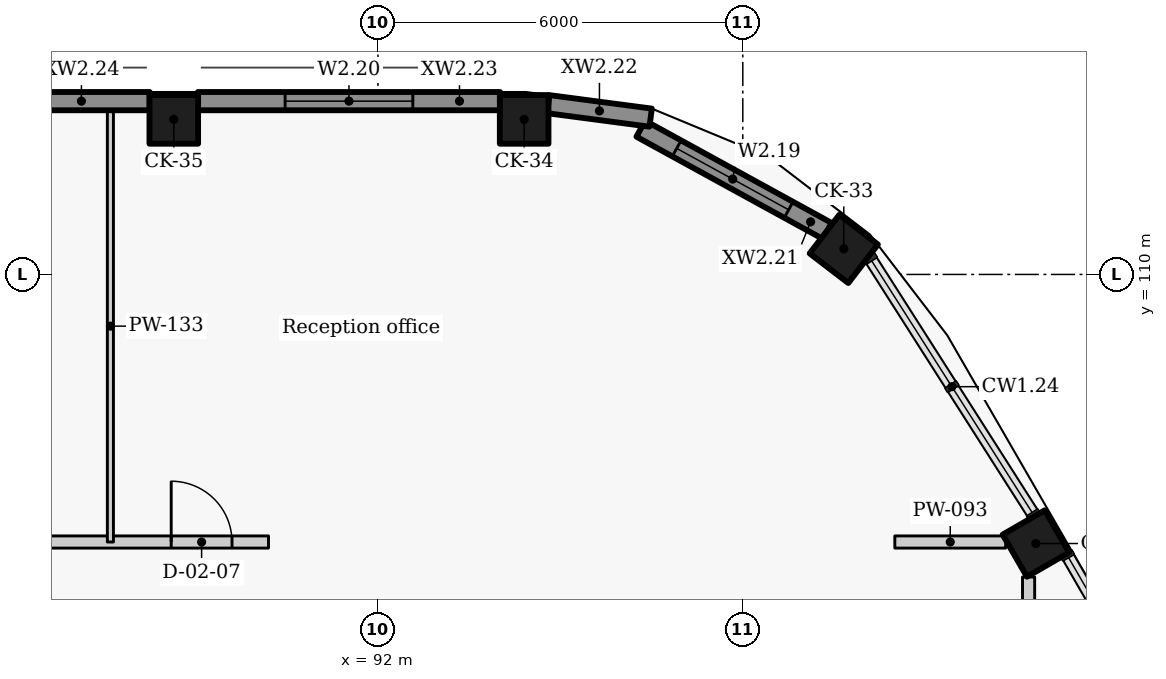
"""IFC4 building model, lengths in metres.
Left out: names, types, materials, properties, quantities, classifications, styles, units other than length and angle.
Written with IfcOpenShell. Run it as: python <this file> out.ifc"""

import sys

from ifc_helpers import new_model, si_unit, direction, frame, frame_2d, origin, origin_2d, place, context, subcontext, project, spatial, rectangle, extrude, element, fill, save


model = new_model("IFC4")
c1 = context("Model", 3, precision=1e-05, world=origin(), true_north=direction((0.0, 1.0)))
c2 = subcontext(c1, "Body", "Model", "MODEL_VIEW")
j1 = project(units=[si_unit("LENGTHUNIT", "METRE"), si_unit("PLANEANGLEUNIT", "RADIAN")], contexts=[c1])
p1 = place(None, origin())
s1 = spatial("IfcSite", under=j1, at=p1, CompositionType="ELEMENT")
p2 = place(p1, origin())
s2 = spatial("IfcBuilding", under=s1, at=p2, CompositionType="ELEMENT")
p3 = place(p2, frame((0.0, 0.0, 6.6)))
s3 = spatial("IfcBuildingStorey", under=s2, at=p3, CompositionType="ELEMENT", Elevation=6.6)
for number, where, z_axis, x_axis in (
    (1, (102.82, 105.575, 0.0), (0.0, 0.0, 1.0), (-0.5, 0.866, 0.0)),
    (2, (99.661, 110.419, 0.0), (0.0, 0.0, 1.0), (-0.793, 0.609, 0.0)),
    (3, (94.404, 112.55, 0.0), (0.0, 0.0, 1.0), (-1.0, 0.0, 0.0)),
    (4, (88.643, 112.55, 0.0), (0.0, 0.0, 1.0), (-1.0, 0.0, 0.0)),
):
    element("IfcColumn", number, at=place(p3, frame(where, z_axis=z_axis, x_axis=x_axis)), inside=s3, PredefinedType="COLUMN", context=c2, shape_type="SweptSolid", body=[
        extrude(rectangle(XDim=0.8, YDim=0.8, at=origin_2d()), origin(), (0.0, 0.0, 1.0), 4.8),
    ])
p4 = place(p3, frame((99.389, 110.715, 0.0), z_axis=(0.0, 0.0, 1.0), x_axis=(-0.876785818174, 0.480881096581, 0.0)))
e5 = element("IfcWall", 5, at=p4, inside=s3, PredefinedType="SOLIDWALL", context=c2, shape_type="SweptSolid", body=[
    extrude(rectangle(XDim=3.497, YDim=0.3, at=frame_2d((1.748, 0.0))), origin(), (0.0, 0.0, 1.0), 3.6),
])
p5 = place(p4, frame((0.723, 0.0, 0.9)))
e6 = element("IfcOpeningElement", 6, at=p5, cuts=e5, PredefinedType="OPENING", context=c2, shape_type="SweptSolid", body=[
    extrude(rectangle(XDim=2.1, YDim=2.05, at=frame_2d((1.05, 1.025))), frame((0.0, 0.16, 0.0), z_axis=(0.0, -1.0, 0.0), x_axis=(1.0, 0.0, 0.0)), (0.0, 0.0, 1.0), 0.32),
])
p6 = place(p3, frame((96.485, 112.579, 0.0), z_axis=(0.0, 0.0, 1.0), x_axis=(-0.991431291018, 0.130629227937, 0.0)))
e7 = element("IfcWall", 7, at=p6, inside=s3, PredefinedType="SOLIDWALL", context=c2, shape_type="SweptSolid", body=[
    extrude(rectangle(XDim=1.699, YDim=0.3, at=frame_2d((0.85, 0.0))), origin(), (0.0, 0.0, 1.0), 3.6),
])
p7 = place(p3, frame((94.008, 112.85, 0.0), z_axis=(0.0, 0.0, 1.0), x_axis=(-1.0, 0.0, 0.0)))
e8 = element("IfcWall", 8, at=p7, inside=s3, PredefinedType="SOLIDWALL", context=c2, shape_type="SweptSolid", body=[
    extrude(rectangle(XDim=4.97, YDim=0.3, at=frame_2d((2.485, 0.0))), origin(), (0.0, 0.0, 1.0), 3.6),
])
p8 = place(p7, frame((1.435, 0.0, 0.9)))
e9 = element("IfcOpeningElement", 9, at=p8, cuts=e8, PredefinedType="OPENING", context=c2, shape_type="SweptSolid", body=[
    extrude(rectangle(XDim=2.1, YDim=2.05, at=frame_2d((1.05, 1.025))), frame((0.0, 0.16, 0.0), z_axis=(0.0, -1.0, 0.0), x_axis=(1.0, 0.0, 0.0)), (0.0, 0.0, 1.0), 0.32),
])
p9 = place(p3, frame((88.247, 112.85, 0.0), z_axis=(0.0, 0.0, 1.0), x_axis=(-1.0, 0.0, 0.0)))
e10 = element("IfcWall", 10, at=p9, inside=s3, PredefinedType="SOLIDWALL", context=c2, shape_type="SweptSolid", body=[
    extrude(rectangle(XDim=4.97, YDim=0.3, at=frame_2d((2.485, 0.0))), origin(), (0.0, 0.0, 1.0), 3.6),
])
p10 = place(p9, frame((2.346, 0.0, 1.5)))
e11 = element("IfcOpeningElement", 11, at=p10, cuts=e10, PredefinedType="OPENING", context=c2, shape_type="SweptSolid", body=[
    extrude(rectangle(XDim=0.9, YDim=1.45, at=frame_2d((0.45, 0.725))), frame((0.0, 0.16, 0.0), z_axis=(0.0, -1.0, 0.0), x_axis=(1.0, 0.0, 0.0)), (0.0, 0.0, 1.0), 0.32),
])
p11 = place(p3, frame((102.7, 105.025, 0.0), z_axis=(0.0, 0.0, 1.0), x_axis=(0.0, -1.0, 0.0)))
e12 = element("IfcWall", 12, at=p11, inside=s3, PredefinedType="PARTITIONING", context=c2, shape_type="SweptSolid", body=[
    extrude(rectangle(XDim=6.578, YDim=0.2, at=frame_2d((3.289, 0.0))), origin(), (0.0, 0.0, 1.0), 4.5),
])
p12 = place(p11, frame((2.539, 0.0, 0.0)))
e13 = element("IfcOpeningElement", 13, at=p12, cuts=e12, PredefinedType="OPENING", context=c2, shape_type="SweptSolid", body=[
    extrude(rectangle(XDim=1.5, YDim=2.1, at=frame_2d((0.75, 1.05))), frame((0.0, 0.11, 0.0), z_axis=(0.0, -1.0, 0.0), x_axis=(1.0, 0.0, 0.0)), (0.0, 0.0, 1.0), 0.22),
])
p13 = place(p3, frame((69.8, 105.6, 0.0), z_axis=(0.0, 0.0, 1.0), x_axis=(1.0, 0.0, 0.0)))
e14 = element("IfcWall", 14, at=p13, inside=s3, PredefinedType="PARTITIONING", context=c2, shape_type="SweptSolid", body=[
    extrude(rectangle(XDim=20.4, YDim=0.2, at=frame_2d((10.2, 0.0))), origin(), (0.0, 0.0, 1.0), 4.5),
])
p14 = place(p13, frame((0.602, 0.0, 0.0)))
e15 = element("IfcOpeningElement", 15, at=p14, cuts=e14, PredefinedType="OPENING", context=c2, shape_type="SweptSolid", body=[
    extrude(rectangle(XDim=1.0, YDim=2.1, at=frame_2d((0.5, 1.05))), frame((0.0, 0.11, 0.0), z_axis=(0.0, -1.0, 0.0), x_axis=(1.0, 0.0, 0.0)), (0.0, 0.0, 1.0), 0.22),
])
p15 = place(p13, frame((18.8, 0.0, 0.0)))
e16 = element("IfcOpeningElement", 16, at=p15, cuts=e14, PredefinedType="OPENING", context=c2, shape_type="SweptSolid", body=[
    extrude(rectangle(XDim=1.0, YDim=2.1, at=frame_2d((0.5, 1.05))), frame((0.0, 0.11, 0.0), z_axis=(0.0, -1.0, 0.0), x_axis=(1.0, 0.0, 0.0)), (0.0, 0.0, 1.0), 0.22),
])
p16 = place(p13, frame((10.3, 0.0, 0.0)))
e17 = element("IfcOpeningElement", 17, at=p16, cuts=e14, PredefinedType="OPENING", context=c2, shape_type="SweptSolid", body=[
    extrude(rectangle(XDim=1.0, YDim=2.1, at=frame_2d((0.5, 1.05))), frame((0.0, 0.11, 0.0), z_axis=(0.0, -1.0, 0.0), x_axis=(1.0, 0.0, 0.0)), (0.0, 0.0, 1.0), 0.22),
])
p17 = place(p3, frame((100.5, 105.6, 0.0), z_axis=(0.0, 0.0, 1.0), x_axis=(1.0, 0.0, 0.0)))
e18 = element("IfcWall", 18, at=p17, inside=s3, PredefinedType="PARTITIONING", context=c2, shape_type="SweptSolid", body=[
    extrude(rectangle(XDim=1.823, YDim=0.2, at=frame_2d((0.912, 0.0))), origin(), (0.0, 0.0, 1.0), 4.5),
])
p18 = place(p3, frame((87.6, 105.6, 0.0), z_axis=(0.0, 0.0, 1.0), x_axis=(0.0, 1.0, 0.0)))
e19 = element("IfcWall", 19, at=p18, inside=s3, PredefinedType="PARTITIONING", context=c2, shape_type="SweptSolid", body=[
    extrude(rectangle(XDim=7.1, YDim=0.1, at=frame_2d((3.55, 0.0))), origin(), (0.0, 0.0, 1.0), 3.73),
])
p19 = place(p5, origin())
e20 = element("IfcWindow", 20, at=p19, inside=s3, PartitioningType="SINGLE_PANEL", PredefinedType="WINDOW", context=c2, shape_type="SweptSolid", body=[
    extrude(rectangle(XDim=2.1, YDim=2.05, at=frame_2d((1.05, 1.025))), frame((0.0, 0.03, 0.0), z_axis=(0.0, -1.0, 0.0), x_axis=(1.0, 0.0, 0.0)), (0.0, 0.0, 1.0), 0.06),
])
fill(e6, e20)
p20 = place(p8, origin())
e21 = element("IfcWindow", 21, at=p20, inside=s3, PartitioningType="SINGLE_PANEL", PredefinedType="WINDOW", context=c2, shape_type="SweptSolid", body=[
    extrude(rectangle(XDim=2.1, YDim=2.05, at=frame_2d((1.05, 1.025))), frame((0.0, 0.03, 0.0), z_axis=(0.0, -1.0, 0.0), x_axis=(1.0, 0.0, 0.0)), (0.0, 0.0, 1.0), 0.06),
])
fill(e9, e21)
p21 = place(p15, origin())
e22 = element("IfcDoor", 22, at=p21, inside=s3, OperationType="SINGLE_SWING_LEFT", PredefinedType="DOOR", context=c2, shape_type="SweptSolid", body=[
    extrude(rectangle(XDim=1.0, YDim=2.1, at=frame_2d((0.5, 1.05))), frame((0.0, 0.025, 0.0), z_axis=(0.0, -1.0, 0.0), x_axis=(1.0, 0.0, 0.0)), (0.0, 0.0, 1.0), 0.05),
])
fill(e16, e22)
save(model, sys.argv[1])
